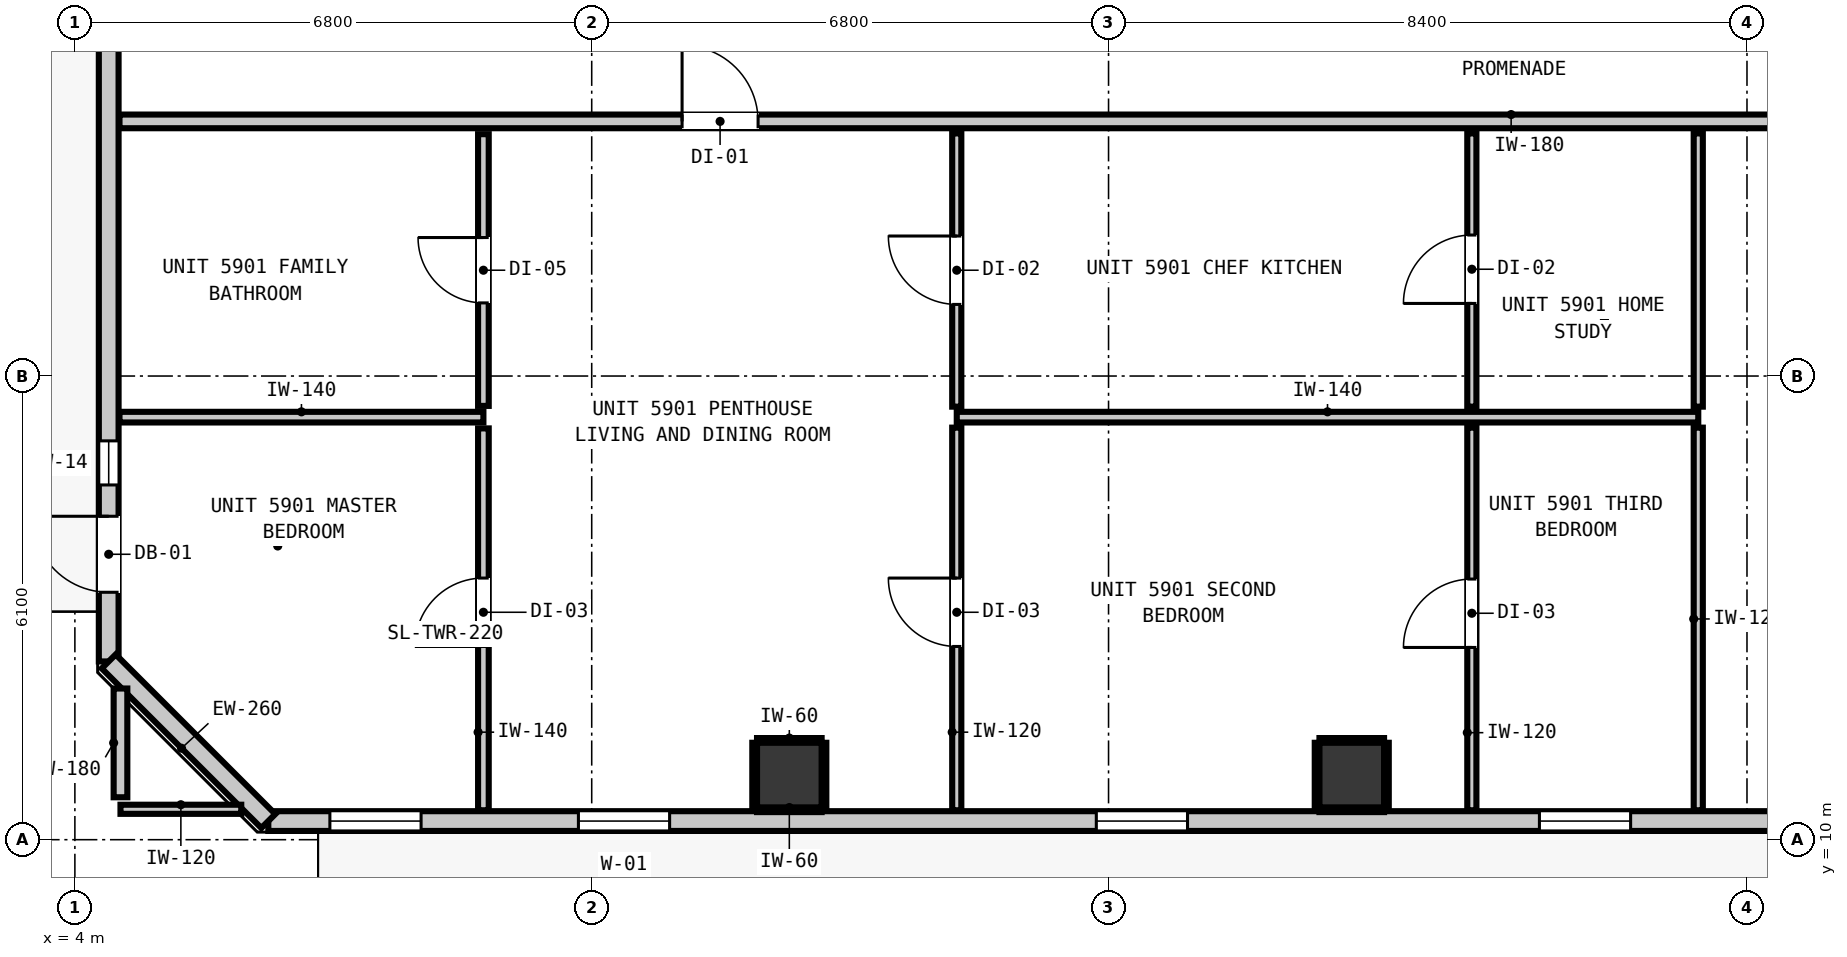
"""IFC4 building model, lengths in metres.
Left out: names, types, materials, properties, quantities, classifications, styles, units other than length and angle.
Written with IfcOpenShell. Run it as: python <this file> out.ifc"""

import sys

from ifc_helpers import new_model, si_unit, direction, frame, frame_2d, origin, origin_2d, place, context, subcontext, project, spatial, rectangle, extrude, element, fill, save


model = new_model("IFC4")
c1 = context("Model", 3, precision=1e-05, world=origin(), true_north=direction((0.0, 1.0)))
c2 = subcontext(c1, "Body", "Model", "MODEL_VIEW")
j1 = project(units=[si_unit("LENGTHUNIT", "METRE"), si_unit("PLANEANGLEUNIT", "RADIAN")], contexts=[c1])
p1 = place(None, origin())
s1 = spatial("IfcSite", under=j1, at=p1, CompositionType="ELEMENT")
p2 = place(p1, origin())
s2 = spatial("IfcBuilding", under=s1, at=p2, CompositionType="ELEMENT")
p3 = place(p2, frame((0.0, 0.0, 203.44)))
s3 = spatial("IfcBuildingStorey", under=s2, at=p3, CompositionType="ELEMENT", Elevation=203.44)
for number, where, z_axis, x_axis in (
    (1, (13.4, 10.85, 0.0), (0.0, 0.0, 1.0), (1.0, 0.0, 0.0)),
    (2, (20.8, 10.85, 0.0), (0.0, 0.0, 1.0), (1.0, 0.0, 0.0)),
):
    element("IfcColumn", number, at=place(p3, frame(where, z_axis=z_axis, x_axis=x_axis)), inside=s3, PredefinedType="COLUMN", context=c2, shape_type="SweptSolid", body=[
        extrude(rectangle(XDim=0.85, YDim=0.85, at=origin_2d()), origin(), (0.0, 0.0, 1.0), 3.32),
    ])
p4 = place(p3, frame((4.445, 12.345, 0.0), z_axis=(0.0, 0.0, 1.0), x_axis=(0.0, 1.0, 0.0)))
e3 = element("IfcWall", 3, at=p4, inside=s3, PredefinedType="STANDARD", context=c2, shape_type="SweptSolid", body=[
    extrude(rectangle(XDim=30.31, YDim=0.26, at=frame_2d((15.155, 0.0))), origin(), (0.0, 0.0, 1.0), 3.1),
])
p5 = place(p4, frame((0.91, 0.0, 0.0)))
e4 = element("IfcOpeningElement", 4, at=p5, cuts=e3, PredefinedType="OPENING", context=c2, shape_type="SweptSolid", body=[
    extrude(rectangle(XDim=1.0, YDim=2.15, at=frame_2d((0.5, 1.075))), frame((0.0, 0.14, 0.0), z_axis=(0.0, -1.0, 0.0), x_axis=(1.0, 0.0, 0.0)), (0.0, 0.0, 1.0), 0.28),
])
p6 = place(p4, frame((2.322, 0.0, 0.85)))
e5 = element("IfcOpeningElement", 5, at=p6, cuts=e3, PredefinedType="OPENING", context=c2, shape_type="SweptSolid", body=[
    extrude(rectangle(XDim=0.58, YDim=1.5, at=frame_2d((0.29, 0.75))), frame((0.0, 0.14, 0.0), z_axis=(0.0, -1.0, 0.0), x_axis=(1.0, 0.0, 0.0)), (0.0, 0.0, 1.0), 0.28),
])
p7 = place(p4, frame((13.405, 0.0, 0.85)))
e6 = element("IfcOpeningElement", 6, at=p7, cuts=e3, PredefinedType="OPENING", context=c2, shape_type="SweptSolid", body=[
    extrude(rectangle(XDim=1.2, YDim=1.8, at=frame_2d((0.6, 0.9))), frame((0.0, 0.14, 0.0), z_axis=(0.0, -1.0, 0.0), x_axis=(1.0, 0.0, 0.0)), (0.0, 0.0, 1.0), 0.28),
])
p8 = place(p3, frame((39.255, 10.245, 0.0), z_axis=(0.0, 0.0, 1.0), x_axis=(-1.0, 0.0, 0.0)))
e7 = element("IfcWall", 7, at=p8, inside=s3, PredefinedType="STANDARD", context=c2, shape_type="SweptSolid", body=[
    extrude(rectangle(XDim=32.71, YDim=0.26, at=frame_2d((16.355, 0.0))), origin(), (0.0, 0.0, 1.0), 3.1),
])
p9 = place(p8, frame((0.907, 0.0, 0.0)))
e8 = element("IfcOpeningElement", 8, at=p9, cuts=e7, PredefinedType="OPENING", context=c2, shape_type="SweptSolid", body=[
    extrude(rectangle(XDim=1.0, YDim=2.15, at=frame_2d((0.5, 1.075))), frame((0.0, 0.14, 0.0), z_axis=(0.0, -1.0, 0.0), x_axis=(1.0, 0.0, 0.0)), (0.0, 0.0, 1.0), 0.28),
])
p10 = place(p8, frame((27.43, 0.0, 0.85)))
e9 = element("IfcOpeningElement", 9, at=p10, cuts=e7, PredefinedType="OPENING", context=c2, shape_type="SweptSolid", body=[
    extrude(rectangle(XDim=1.2, YDim=1.8, at=frame_2d((0.6, 0.9))), frame((0.0, 0.14, 0.0), z_axis=(0.0, -1.0, 0.0), x_axis=(1.0, 0.0, 0.0)), (0.0, 0.0, 1.0), 0.28),
])
p11 = place(p8, frame((30.7, 0.0, 0.85)))
e10 = element("IfcOpeningElement", 10, at=p11, cuts=e7, PredefinedType="OPENING", context=c2, shape_type="SweptSolid", body=[
    extrude(rectangle(XDim=1.2, YDim=1.8, at=frame_2d((0.6, 0.9))), frame((0.0, 0.14, 0.0), z_axis=(0.0, -1.0, 0.0), x_axis=(1.0, 0.0, 0.0)), (0.0, 0.0, 1.0), 0.28),
])
p12 = place(p8, frame((20.616, 0.0, 0.85)))
e11 = element("IfcOpeningElement", 11, at=p12, cuts=e7, PredefinedType="OPENING", context=c2, shape_type="SweptSolid", body=[
    extrude(rectangle(XDim=1.2, YDim=1.8, at=frame_2d((0.6, 0.9))), frame((0.0, 0.14, 0.0), z_axis=(0.0, -1.0, 0.0), x_axis=(1.0, 0.0, 0.0)), (0.0, 0.0, 1.0), 0.28),
])
p13 = place(p8, frame((14.786, 0.0, 0.85)))
e12 = element("IfcOpeningElement", 12, at=p13, cuts=e7, PredefinedType="OPENING", context=c2, shape_type="SweptSolid", body=[
    extrude(rectangle(XDim=1.2, YDim=1.8, at=frame_2d((0.6, 0.9))), frame((0.0, 0.14, 0.0), z_axis=(0.0, -1.0, 0.0), x_axis=(1.0, 0.0, 0.0)), (0.0, 0.0, 1.0), 0.28),
])
p14 = place(p8, frame((5.805, 0.0, 0.85)))
e13 = element("IfcOpeningElement", 13, at=p14, cuts=e7, PredefinedType="OPENING", context=c2, shape_type="SweptSolid", body=[
    extrude(rectangle(XDim=1.2, YDim=1.8, at=frame_2d((0.6, 0.9))), frame((0.0, 0.14, 0.0), z_axis=(0.0, -1.0, 0.0), x_axis=(1.0, 0.0, 0.0)), (0.0, 0.0, 1.0), 0.28),
])
p15 = place(p3, frame((6.545, 10.245, 0.0), z_axis=(0.0, 0.0, 1.0), x_axis=(-0.707106781187, 0.707106781187, 0.0)))
e14 = element("IfcWall", 14, at=p15, inside=s3, PredefinedType="STANDARD", context=c2, shape_type="SweptSolid", body=[
    extrude(rectangle(XDim=2.97, YDim=0.26, at=frame_2d((1.485, 0.0))), origin(), (0.0, 0.0, 1.0), 3.1),
])
p16 = place(p3, frame((4.587, 19.45, 0.0), z_axis=(0.0, 0.0, 1.0), x_axis=(1.0, 0.0, 0.0)))
e15 = element("IfcWall", 15, at=p16, inside=s3, PredefinedType="PARTITIONING", context=c2, shape_type="SweptSolid", body=[
    extrude(rectangle(XDim=36.626, YDim=0.18, at=frame_2d((18.313, 0.0))), origin(), (0.0, 0.0, 1.0), 3.1),
])
p17 = place(p16, frame((7.402, 0.0, 0.0)))
e16 = element("IfcOpeningElement", 16, at=p17, cuts=e15, PredefinedType="OPENING", context=c2, shape_type="SweptSolid", body=[
    extrude(rectangle(XDim=1.0, YDim=2.15, at=frame_2d((0.5, 1.075))), frame((0.0, 0.1, 0.0), z_axis=(0.0, -1.0, 0.0), x_axis=(1.0, 0.0, 0.0)), (0.0, 0.0, 1.0), 0.2),
])
p18 = place(p16, frame((28.218, 0.0, 0.0)))
e17 = element("IfcOpeningElement", 17, at=p18, cuts=e15, PredefinedType="OPENING", context=c2, shape_type="SweptSolid", body=[
    extrude(rectangle(XDim=0.9, YDim=2.1, at=frame_2d((0.45, 1.05))), frame((0.0, 0.1, 0.0), z_axis=(0.0, -1.0, 0.0), x_axis=(1.0, 0.0, 0.0)), (0.0, 0.0, 1.0), 0.2),
])
p19 = place(p3, frame((4.587, 15.559, 0.0), z_axis=(0.0, 0.0, 1.0), x_axis=(1.0, 0.0, 0.0)))
e18 = element("IfcWall", 18, at=p19, inside=s3, PredefinedType="PARTITIONING", context=c2, shape_type="SweptSolid", body=[
    extrude(rectangle(XDim=4.788, YDim=0.14, at=frame_2d((2.394, 0.0))), origin(), (0.0, 0.0, 1.0), 3.1),
])
p20 = place(p3, frame((15.603, 15.559, 0.0), z_axis=(0.0, 0.0, 1.0), x_axis=(1.0, 0.0, 0.0)))
e19 = element("IfcWall", 19, at=p20, inside=s3, PredefinedType="PARTITIONING", context=c2, shape_type="SweptSolid", body=[
    extrude(rectangle(XDim=9.756, YDim=0.14, at=frame_2d((4.878, 0.0))), origin(), (0.0, 0.0, 1.0), 3.1),
])
p21 = place(p3, frame((4.6, 10.4, 0.0), z_axis=(0.0, 0.0, 1.0), x_axis=(1.0, 0.0, 0.0)))
e20 = element("IfcWall", 20, at=p21, inside=s3, PredefinedType="PARTITIONING", context=c2, shape_type="SweptSolid", body=[
    extrude(rectangle(XDim=1.589, YDim=0.12, at=frame_2d((0.794, 0.0))), origin(), (0.0, 0.0, 1.0), 3.1),
])
p22 = place(p3, frame((4.6, 10.558, 0.0), z_axis=(0.0, 0.0, 1.0), x_axis=(0.0, 1.0, 0.0)))
e21 = element("IfcWall", 21, at=p22, inside=s3, PredefinedType="PARTITIONING", context=c2, shape_type="SweptSolid", body=[
    extrude(rectangle(XDim=1.431, YDim=0.18, at=frame_2d((0.715, 0.0))), origin(), (0.0, 0.0, 1.0), 3.1),
])
p23 = place(p3, frame((9.375, 10.387, 0.0), z_axis=(0.0, 0.0, 1.0), x_axis=(0.0, 1.0, 0.0)))
e22 = element("IfcWall", 22, at=p23, inside=s3, PredefinedType="PARTITIONING", context=c2, shape_type="SweptSolid", body=[
    extrude(rectangle(XDim=5.024, YDim=0.14, at=frame_2d((2.512, 0.0))), origin(), (0.0, 0.0, 1.0), 3.1),
])
p24 = place(p23, frame((2.155, 0.0, 0.0)))
e23 = element("IfcOpeningElement", 23, at=p24, cuts=e22, PredefinedType="OPENING", context=c2, shape_type="SweptSolid", body=[
    extrude(rectangle(XDim=0.9, YDim=2.1, at=frame_2d((0.45, 1.05))), frame((0.0, 0.08, 0.0), z_axis=(0.0, -1.0, 0.0), x_axis=(1.0, 0.0, 0.0)), (0.0, 0.0, 1.0), 0.16),
])
p25 = place(p3, frame((9.375, 15.707, 0.0), z_axis=(0.0, 0.0, 1.0), x_axis=(0.0, 1.0, 0.0)))
e24 = element("IfcWall", 24, at=p25, inside=s3, PredefinedType="PARTITIONING", context=c2, shape_type="SweptSolid", body=[
    extrude(rectangle(XDim=3.575, YDim=0.14, at=frame_2d((1.788, 0.0))), origin(), (0.0, 0.0, 1.0), 2.477),
])
p26 = place(p25, frame((1.355, 0.0, 0.0)))
e25 = element("IfcOpeningElement", 25, at=p26, cuts=e24, PredefinedType="OPENING", context=c2, shape_type="SweptSolid", body=[
    extrude(rectangle(XDim=0.86, YDim=2.02, at=frame_2d((0.43, 1.01))), frame((0.0, 0.08, 0.0), z_axis=(0.0, -1.0, 0.0), x_axis=(1.0, 0.0, 0.0)), (0.0, 0.0, 1.0), 0.16),
])
p27 = place(p3, frame((15.603, 10.387, 0.0), z_axis=(0.0, 0.0, 1.0), x_axis=(0.0, 1.0, 0.0)))
e26 = element("IfcWall", 26, at=p27, inside=s3, PredefinedType="PARTITIONING", context=c2, shape_type="SweptSolid", body=[
    extrude(rectangle(XDim=5.034, YDim=0.12, at=frame_2d((2.517, 0.0))), origin(), (0.0, 0.0, 1.0), 3.1),
])
p28 = place(p27, frame((2.155, 0.0, 0.0)))
e27 = element("IfcOpeningElement", 27, at=p28, cuts=e26, PredefinedType="OPENING", context=c2, shape_type="SweptSolid", body=[
    extrude(rectangle(XDim=0.9, YDim=2.1, at=frame_2d((0.45, 1.05))), frame((0.0, 0.07, 0.0), z_axis=(0.0, -1.0, 0.0), x_axis=(1.0, 0.0, 0.0)), (0.0, 0.0, 1.0), 0.14),
])
p29 = place(p3, frame((15.603, 15.697, 0.0), z_axis=(0.0, 0.0, 1.0), x_axis=(0.0, 1.0, 0.0)))
e28 = element("IfcWall", 28, at=p29, inside=s3, PredefinedType="PARTITIONING", context=c2, shape_type="SweptSolid", body=[
    extrude(rectangle(XDim=3.595, YDim=0.12, at=frame_2d((1.797, 0.0))), origin(), (0.0, 0.0, 1.0), 3.1),
])
p30 = place(p29, frame((1.345, 0.0, 0.0)))
e29 = element("IfcOpeningElement", 29, at=p30, cuts=e28, PredefinedType="OPENING", context=c2, shape_type="SweptSolid", body=[
    extrude(rectangle(XDim=0.9, YDim=2.1, at=frame_2d((0.45, 1.05))), frame((0.0, 0.07, 0.0), z_axis=(0.0, -1.0, 0.0), x_axis=(1.0, 0.0, 0.0)), (0.0, 0.0, 1.0), 0.14),
])
p31 = place(p3, frame((22.38, 10.387, 0.0), z_axis=(0.0, 0.0, 1.0), x_axis=(0.0, 1.0, 0.0)))
e30 = element("IfcWall", 30, at=p31, inside=s3, PredefinedType="PARTITIONING", context=c2, shape_type="SweptSolid", body=[
    extrude(rectangle(XDim=5.034, YDim=0.12, at=frame_2d((2.517, 0.0))), origin(), (0.0, 0.0, 1.0), 3.1),
])
p32 = place(p31, frame((2.142, 0.0, 0.0)))
e31 = element("IfcOpeningElement", 31, at=p32, cuts=e30, PredefinedType="OPENING", context=c2, shape_type="SweptSolid", body=[
    extrude(rectangle(XDim=0.9, YDim=2.1, at=frame_2d((0.45, 1.05))), frame((0.0, 0.07, 0.0), z_axis=(0.0, -1.0, 0.0), x_axis=(1.0, 0.0, 0.0)), (0.0, 0.0, 1.0), 0.14),
])
p33 = place(p3, frame((22.38, 15.697, 0.0), z_axis=(0.0, 0.0, 1.0), x_axis=(0.0, 1.0, 0.0)))
e32 = element("IfcWall", 32, at=p33, inside=s3, PredefinedType="PARTITIONING", context=c2, shape_type="SweptSolid", body=[
    extrude(rectangle(XDim=3.595, YDim=0.12, at=frame_2d((1.797, 0.0))), origin(), (0.0, 0.0, 1.0), 3.1),
])
p34 = place(p33, frame((1.358, 0.0, 0.0)))
e33 = element("IfcOpeningElement", 33, at=p34, cuts=e32, PredefinedType="OPENING", context=c2, shape_type="SweptSolid", body=[
    extrude(rectangle(XDim=0.9, YDim=2.1, at=frame_2d((0.45, 1.05))), frame((0.0, 0.07, 0.0), z_axis=(0.0, -1.0, 0.0), x_axis=(1.0, 0.0, 0.0)), (0.0, 0.0, 1.0), 0.14),
])
p35 = place(p3, frame((25.359, 10.387, 0.0), z_axis=(0.0, 0.0, 1.0), x_axis=(0.0, 1.0, 0.0)))
e34 = element("IfcWall", 34, at=p35, inside=s3, PredefinedType="PARTITIONING", context=c2, shape_type="SweptSolid", body=[
    extrude(rectangle(XDim=5.034, YDim=0.12, at=frame_2d((2.517, 0.0))), origin(), (0.0, 0.0, 1.0), 3.1),
])
p36 = place(p3, frame((25.359, 15.697, 0.0), z_axis=(0.0, 0.0, 1.0), x_axis=(0.0, 1.0, 0.0)))
e35 = element("IfcWall", 35, at=p36, inside=s3, PredefinedType="PARTITIONING", context=c2, shape_type="SweptSolid", body=[
    extrude(rectangle(XDim=3.595, YDim=0.12, at=frame_2d((1.797, 0.0))), origin(), (0.0, 0.0, 1.0), 3.1),
])
for number, where, z_axis, x_axis in (
    (36, (12.975, 10.393, 0.0), (0.0, 0.0, 1.0), (1.0, 0.0, 0.0)),
    (37, (12.975, 11.307, 0.0), (0.0, 0.0, 1.0), (1.0, 0.0, 0.0)),
    (38, (12.943, 10.425, 0.0), (0.0, 0.0, 1.0), (0.0, 1.0, 0.0)),
    (39, (13.857, 10.425, 0.0), (0.0, 0.0, 1.0), (0.0, 1.0, 0.0)),
):
    element("IfcWall", number, at=place(p3, frame(where, z_axis=z_axis, x_axis=x_axis)), inside=s3, PredefinedType="PARTITIONING", context=c2, shape_type="SweptSolid", body=[
        extrude(rectangle(XDim=0.85, YDim=0.06, at=frame_2d((0.425, 0.0))), origin(), (0.0, 0.0, 1.0), 1.45),
    ])
for number, where, z_axis, x_axis in (
    (40, (20.375, 10.393, 0.0), (0.0, 0.0, 1.0), (1.0, 0.0, 0.0)),
    (41, (20.375, 11.307, 0.0), (0.0, 0.0, 1.0), (1.0, 0.0, 0.0)),
):
    element("IfcWall", number, at=place(p3, frame(where, z_axis=z_axis, x_axis=x_axis)), inside=s3, PredefinedType="PARTITIONING", context=c2, shape_type="SweptSolid", body=[
        extrude(rectangle(XDim=0.85, YDim=0.06, at=frame_2d((0.425, 0.0))), origin(), (0.0, 0.0, 1.0), 1.45),
    ])
for number, where, z_axis, x_axis in (
    (42, (20.343, 10.425, 0.0), (0.0, 0.0, 1.0), (0.0, 1.0, 0.0)),
    (43, (21.257, 10.425, 0.0), (0.0, 0.0, 1.0), (0.0, 1.0, 0.0)),
):
    element("IfcWall", number, at=place(p3, frame(where, z_axis=z_axis, x_axis=x_axis)), inside=s3, PredefinedType="PARTITIONING", context=c2, shape_type="SweptSolid", body=[
        extrude(rectangle(XDim=0.85, YDim=0.06, at=frame_2d((0.425, 0.0))), origin(), (0.0, 0.0, 1.0), 1.45),
    ])
p37 = place(p5, origin())
e44 = element("IfcDoor", 44, at=p37, inside=s3, OperationType="SINGLE_SWING_RIGHT", PredefinedType="DOOR", context=c2, shape_type="SweptSolid", body=[
    extrude(rectangle(XDim=1.0, YDim=2.15, at=frame_2d((0.5, 1.075))), frame((0.0, 0.025, 0.0), z_axis=(0.0, -1.0, 0.0), x_axis=(1.0, 0.0, 0.0)), (0.0, 0.0, 1.0), 0.05),
])
fill(e4, e44)
p38 = place(p6, origin())
e45 = element("IfcWindow", 45, at=p38, inside=s3, PartitioningType="SINGLE_PANEL", PredefinedType="WINDOW", context=c2, shape_type="SweptSolid", body=[
    extrude(rectangle(XDim=0.58, YDim=1.5, at=frame_2d((0.29, 0.75))), frame((0.0, 0.03, 0.0), z_axis=(0.0, -1.0, 0.0), x_axis=(1.0, 0.0, 0.0)), (0.0, 0.0, 1.0), 0.06),
])
fill(e5, e45)
p39 = place(p10, origin())
e46 = element("IfcWindow", 46, at=p39, inside=s3, PartitioningType="SINGLE_PANEL", PredefinedType="WINDOW", context=c2, shape_type="SweptSolid", body=[
    extrude(rectangle(XDim=1.2, YDim=1.8, at=frame_2d((0.6, 0.9))), frame((0.0, 0.03, 0.0), z_axis=(0.0, -1.0, 0.0), x_axis=(1.0, 0.0, 0.0)), (0.0, 0.0, 1.0), 0.06),
])
fill(e9, e46)
p40 = place(p11, origin())
e47 = element("IfcWindow", 47, at=p40, inside=s3, PartitioningType="SINGLE_PANEL", PredefinedType="WINDOW", context=c2, shape_type="SweptSolid", body=[
    extrude(rectangle(XDim=1.2, YDim=1.8, at=frame_2d((0.6, 0.9))), frame((0.0, 0.03, 0.0), z_axis=(0.0, -1.0, 0.0), x_axis=(1.0, 0.0, 0.0)), (0.0, 0.0, 1.0), 0.06),
])
fill(e10, e47)
p41 = place(p12, origin())
e48 = element("IfcWindow", 48, at=p41, inside=s3, PartitioningType="SINGLE_PANEL", PredefinedType="WINDOW", context=c2, shape_type="SweptSolid", body=[
    extrude(rectangle(XDim=1.2, YDim=1.8, at=frame_2d((0.6, 0.9))), frame((0.0, 0.03, 0.0), z_axis=(0.0, -1.0, 0.0), x_axis=(1.0, 0.0, 0.0)), (0.0, 0.0, 1.0), 0.06),
])
fill(e11, e48)
p42 = place(p13, origin())
e49 = element("IfcWindow", 49, at=p42, inside=s3, PartitioningType="SINGLE_PANEL", PredefinedType="WINDOW", context=c2, shape_type="SweptSolid", body=[
    extrude(rectangle(XDim=1.2, YDim=1.8, at=frame_2d((0.6, 0.9))), frame((0.0, 0.03, 0.0), z_axis=(0.0, -1.0, 0.0), x_axis=(1.0, 0.0, 0.0)), (0.0, 0.0, 1.0), 0.06),
])
fill(e12, e49)
p43 = place(p17, origin())
e50 = element("IfcDoor", 50, at=p43, inside=s3, OperationType="SINGLE_SWING_LEFT", PredefinedType="DOOR", context=c2, shape_type="SweptSolid", body=[
    extrude(rectangle(XDim=1.0, YDim=2.15, at=frame_2d((0.5, 1.075))), frame((0.0, 0.025, 0.0), z_axis=(0.0, -1.0, 0.0), x_axis=(1.0, 0.0, 0.0)), (0.0, 0.0, 1.0), 0.05),
])
fill(e16, e50)
p44 = place(p26, origin())
e51 = element("IfcDoor", 51, at=p44, inside=s3, OperationType="SINGLE_SWING_RIGHT", PredefinedType="DOOR", context=c2, shape_type="SweptSolid", body=[
    extrude(rectangle(XDim=0.86, YDim=2.02, at=frame_2d((0.43, 1.01))), frame((0.0, 0.025, 0.0), z_axis=(0.0, -1.0, 0.0), x_axis=(1.0, 0.0, 0.0)), (0.0, 0.0, 1.0), 0.05),
])
fill(e25, e51)
p45 = place(p24, origin())
e52 = element("IfcDoor", 52, at=p45, inside=s3, OperationType="SINGLE_SWING_LEFT", PredefinedType="DOOR", context=c2, shape_type="SweptSolid", body=[
    extrude(rectangle(XDim=0.9, YDim=2.1, at=frame_2d((0.45, 1.05))), frame((0.0, 0.025, 0.0), z_axis=(0.0, -1.0, 0.0), x_axis=(1.0, 0.0, 0.0)), (0.0, 0.0, 1.0), 0.05),
])
fill(e23, e52)
p46 = place(p30, origin())
e53 = element("IfcDoor", 53, at=p46, inside=s3, OperationType="SINGLE_SWING_RIGHT", PredefinedType="DOOR", context=c2, shape_type="SweptSolid", body=[
    extrude(rectangle(XDim=0.9, YDim=2.1, at=frame_2d((0.45, 1.05))), frame((0.0, 0.025, 0.0), z_axis=(0.0, -1.0, 0.0), x_axis=(1.0, 0.0, 0.0)), (0.0, 0.0, 1.0), 0.05),
])
fill(e29, e53)
p47 = place(p34, origin())
e54 = element("IfcDoor", 54, at=p47, inside=s3, OperationType="SINGLE_SWING_LEFT", PredefinedType="DOOR", context=c2, shape_type="SweptSolid", body=[
    extrude(rectangle(XDim=0.9, YDim=2.1, at=frame_2d((0.45, 1.05))), frame((0.0, 0.025, 0.0), z_axis=(0.0, -1.0, 0.0), x_axis=(1.0, 0.0, 0.0)), (0.0, 0.0, 1.0), 0.05),
])
fill(e33, e54)
p48 = place(p28, origin())
e55 = element("IfcDoor", 55, at=p48, inside=s3, OperationType="SINGLE_SWING_RIGHT", PredefinedType="DOOR", context=c2, shape_type="SweptSolid", body=[
    extrude(rectangle(XDim=0.9, YDim=2.1, at=frame_2d((0.45, 1.05))), frame((0.0, 0.025, 0.0), z_axis=(0.0, -1.0, 0.0), x_axis=(1.0, 0.0, 0.0)), (0.0, 0.0, 1.0), 0.05),
])
fill(e27, e55)
p49 = place(p32, origin())
e56 = element("IfcDoor", 56, at=p49, inside=s3, OperationType="SINGLE_SWING_LEFT", PredefinedType="DOOR", context=c2, shape_type="SweptSolid", body=[
    extrude(rectangle(XDim=0.9, YDim=2.1, at=frame_2d((0.45, 1.05))), frame((0.0, 0.025, 0.0), z_axis=(0.0, -1.0, 0.0), x_axis=(1.0, 0.0, 0.0)), (0.0, 0.0, 1.0), 0.05),
])
fill(e31, e56)
save(model, sys.argv[1])
